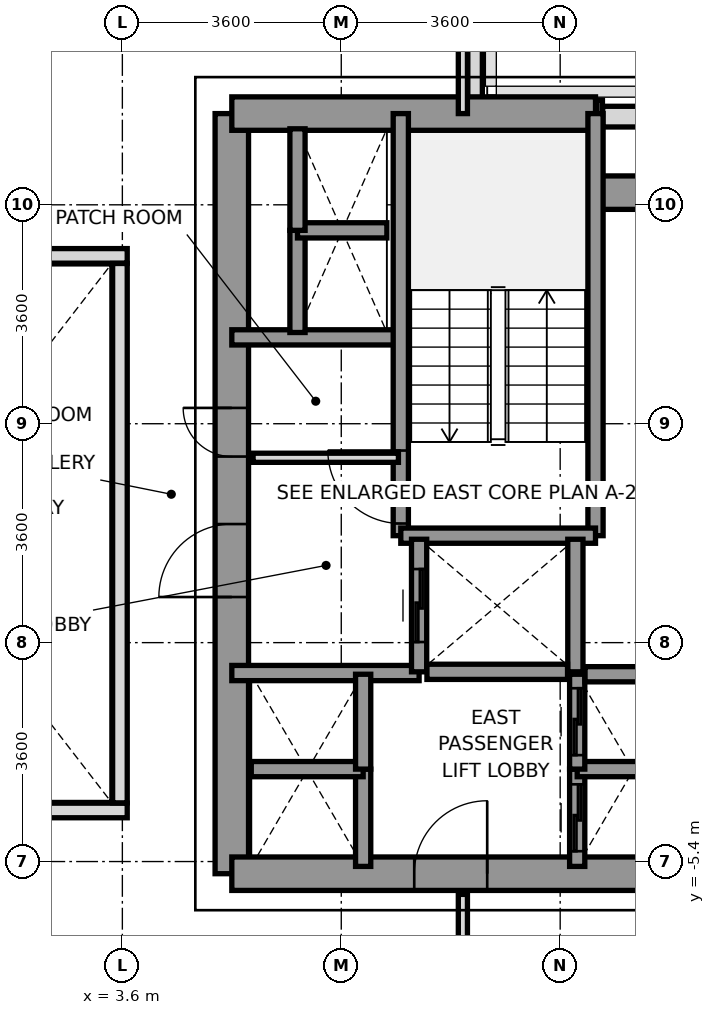
"""IFC4 building model, lengths in metres.
Left out: names, types, materials, properties, quantities, classifications, styles, units other than length and angle.
Written with IfcOpenShell. Run it as: python <this file> out.ifc"""

import sys

from ifc_helpers import new_model, si_unit, direction, frame, frame_2d, origin, place, context, subcontext, project, spatial, rectangle, extrude, source, transform, mapped, element, fill, save


model = new_model("IFC4")
c1 = context("Model", 3, precision=1e-05, world=origin(), true_north=direction((0.0, 1.0)))
c2 = subcontext(c1, "Body", "Model", "MODEL_VIEW")
j1 = project(units=[si_unit("LENGTHUNIT", "METRE"), si_unit("PLANEANGLEUNIT", "RADIAN")], contexts=[c1])
p1 = place(None, origin())
s1 = spatial("IfcSite", under=j1, at=p1, CompositionType="ELEMENT")
p2 = place(p1, origin())
s2 = spatial("IfcBuilding", under=s1, at=p2, CompositionType="ELEMENT")
p3 = place(p2, frame((0.0, 0.0, 74.8)))
s3 = spatial("IfcBuildingStorey", under=s2, at=p3, CompositionType="ELEMENT", Elevation=74.8)
p4 = place(p3, frame((11.498, 6.85, 0.0), z_axis=(0.0, 0.0, 1.0), x_axis=(1.0, 0.0, 0.0)))
e1 = element("IfcWall", 1, at=p4, inside=s3, PredefinedType="SOLIDWALL", context=c2, shape_type="SweptSolid", body=[
    extrude(rectangle(XDim=2.535, YDim=0.34, at=frame_2d((1.268, 0.0))), origin(), (0.0, 0.0, 1.0), 3.2),
])
p5 = place(p3, frame((9.4, 8.397, 0.0), z_axis=(0.0, 0.0, 1.0), x_axis=(0.0, -1.0, 0.0)))
e2 = element("IfcWall", 2, at=p5, inside=s3, PredefinedType="PARAPET", context=c2, shape_type="SweptSolid", body=[
    extrude(rectangle(XDim=1.444, YDim=0.24, at=frame_2d((0.722, 0.0))), origin(), (0.0, 0.0, 1.0), 1.15),
])
p6 = place(p3, frame((11.403, 7.0, 0.0), z_axis=(0.0, 0.0, 1.0), x_axis=(1.0, 0.0, 0.0)))
e3 = element("IfcWall", 3, at=p6, inside=s3, PredefinedType="PARAPET", context=c2, shape_type="SweptSolid", body=[
    extrude(rectangle(XDim=0.092, YDim=0.24, at=frame_2d((0.046, 0.0))), origin(), (0.0, 0.0, 1.0), 1.15),
])
p7 = place(p3, frame((5.4, -5.6, 0.0), z_axis=(0.0, 0.0, 1.0), x_axis=(0.0, 1.0, 0.0)))
e4 = element("IfcWall", 4, at=p7, inside=s3, PredefinedType="SHEAR", context=c2, shape_type="SweptSolid", body=[
    extrude(rectangle(XDim=12.5, YDim=0.55, at=frame_2d((6.25, 0.0))), origin(), (0.0, 0.0, 1.0), 3.2),
])
p8 = place(p7, frame((4.55, 0.0, 0.0)))
e5 = element("IfcOpeningElement", 5, at=p8, cuts=e4, PredefinedType="OPENING", context=c2, shape_type="SweptSolid", body=[
    extrude(rectangle(XDim=1.2, YDim=2.2, at=frame_2d((0.6, 1.1))), frame((0.0, 0.285, 0.0), z_axis=(0.0, -1.0, 0.0), x_axis=(1.0, 0.0, 0.0)), (0.0, 0.0, 1.0), 0.57),
])
p9 = place(p7, frame((6.86, 0.0, 0.0)))
e6 = element("IfcOpeningElement", 6, at=p9, cuts=e4, PredefinedType="OPENING", context=c2, shape_type="SweptSolid", body=[
    extrude(rectangle(XDim=0.8, YDim=2.1, at=frame_2d((0.4, 1.05))), frame((0.0, 0.285, 0.0), z_axis=(0.0, -1.0, 0.0), x_axis=(1.0, 0.0, 0.0)), (0.0, 0.0, 1.0), 0.57),
])
p10 = place(p3, frame((5.4, 6.9, 0.0), z_axis=(0.0, 0.0, 1.0), x_axis=(1.0, 0.0, 0.0)))
e7 = element("IfcWall", 7, at=p10, inside=s3, PredefinedType="SHEAR", context=c2, shape_type="SweptSolid", body=[
    extrude(rectangle(XDim=5.981, YDim=0.55, at=frame_2d((2.991, 0.0))), origin(), (0.0, 0.0, 1.0), 3.2),
])
p11 = place(p3, frame((11.381, 5.6, 0.0), z_axis=(0.0, 0.0, 1.0), x_axis=(1.0, 0.0, 0.0)))
e8 = element("IfcWall", 8, at=p11, inside=s3, PredefinedType="SHEAR", context=c2, shape_type="SweptSolid", body=[
    extrude(rectangle(XDim=1.819, YDim=0.55, at=frame_2d((0.909, 0.0))), origin(), (0.0, 0.0, 1.0), 3.2),
])
p12 = place(p3, frame((5.4, -5.6, 0.0), z_axis=(0.0, 0.0, 1.0), x_axis=(1.0, 0.0, 0.0)))
e9 = element("IfcWall", 9, at=p12, inside=s3, PredefinedType="SHEAR", context=c2, shape_type="SweptSolid", body=[
    extrude(rectangle(XDim=7.8, YDim=0.55, at=frame_2d((3.9, 0.0))), origin(), (0.0, 0.0, 1.0), 3.2),
])
p13 = place(p12, frame((3.0, 0.0, 0.0)))
e10 = element("IfcOpeningElement", 10, at=p13, cuts=e9, PredefinedType="OPENING", context=c2, shape_type="SweptSolid", body=[
    extrude(rectangle(XDim=1.2, YDim=2.2, at=frame_2d((0.6, 1.1))), frame((0.0, 0.285, 0.0), z_axis=(0.0, -1.0, 0.0), x_axis=(1.0, 0.0, 0.0)), (0.0, 0.0, 1.0), 0.57),
])
p14 = place(p3, frame((5.4, 3.22, 0.0), z_axis=(0.0, 0.0, 1.0), x_axis=(1.0, 0.0, 0.0)))
e11 = element("IfcWall", 11, at=p14, inside=s3, PredefinedType="SOLIDWALL", context=c2, shape_type="SweptSolid", body=[
    extrude(rectangle(XDim=2.78, YDim=0.25, at=frame_2d((1.39, 0.0))), origin(), (0.0, 0.0, 1.0), 3.2),
])
p15 = place(p3, frame((5.4, -2.3, 0.0), z_axis=(0.0, 0.0, 1.0), x_axis=(1.0, 0.0, 0.0)))
e12 = element("IfcWall", 12, at=p15, inside=s3, PredefinedType="SOLIDWALL", context=c2, shape_type="SweptSolid", body=[
    extrude(rectangle(XDim=3.08, YDim=0.25, at=frame_2d((1.54, 0.0))), origin(), (0.0, 0.0, 1.0), 3.2),
])
p16 = place(p3, frame((8.179, -0.041, 0.0), z_axis=(0.0, 0.0, 1.0), x_axis=(0.0, 1.0, 0.0)))
e13 = element("IfcWall", 13, at=p16, inside=s3, PredefinedType="SOLIDWALL", context=c2, shape_type="SweptSolid", body=[
    extrude(rectangle(XDim=6.941, YDim=0.25, at=frame_2d((3.47, 0.0))), origin(), (0.0, 0.0, 1.0), 3.2),
])
p17 = place(p16, frame((0.2, 0.0, 0.0)))
e14 = element("IfcOpeningElement", 14, at=p17, cuts=e13, PredefinedType="OPENING", context=c2, shape_type="SweptSolid", body=[
    extrude(rectangle(XDim=1.2, YDim=2.2, at=frame_2d((0.6, 1.1))), frame((0.0, 0.135, 0.0), z_axis=(0.0, -1.0, 0.0), x_axis=(1.0, 0.0, 0.0)), (0.0, 0.0, 1.0), 0.27),
])
p18 = place(p3, frame((11.381, -0.041, 0.0), z_axis=(0.0, 0.0, 1.0), x_axis=(0.0, 1.0, 0.0)))
e15 = element("IfcWall", 15, at=p18, inside=s3, PredefinedType="SOLIDWALL", context=c2, shape_type="SweptSolid", body=[
    extrude(rectangle(XDim=6.941, YDim=0.25, at=frame_2d((3.47, 0.0))), origin(), (0.0, 0.0, 1.0), 3.2),
])
p19 = place(p3, frame((8.179, -0.041, 0.0), z_axis=(0.0, 0.0, 1.0), x_axis=(1.0, 0.0, 0.0)))
e16 = element("IfcWall", 16, at=p19, inside=s3, PredefinedType="SOLIDWALL", context=c2, shape_type="SweptSolid", body=[
    extrude(rectangle(XDim=3.202, YDim=0.25, at=frame_2d((1.601, 0.0))), origin(), (0.0, 0.0, 1.0), 3.2),
])
p20 = place(p3, frame((8.48, -2.28, 0.0), z_axis=(0.0, 0.0, 1.0), x_axis=(0.0, 1.0, 0.0)))
e17 = element("IfcWall", 17, at=p20, inside=s3, PredefinedType="SOLIDWALL", context=c2, shape_type="SweptSolid", body=[
    extrude(rectangle(XDim=2.18, YDim=0.25, at=frame_2d((1.09, 0.0))), origin(), (0.0, 0.0, 1.0), 3.2),
])
p21 = place(p20, frame((0.49, 0.0, 0.0)))
e18 = element("IfcOpeningElement", 18, at=p21, cuts=e17, PredefinedType="OPENING", context=c2, shape_type="SweptSolid", body=[
    extrude(rectangle(XDim=1.2, YDim=2.2, at=frame_2d((0.6, 1.1))), frame((0.0, 0.135, 0.0), z_axis=(0.0, -1.0, 0.0), x_axis=(1.0, 0.0, 0.0)), (0.0, 0.0, 1.0), 0.27),
])
p22 = place(p3, frame((11.05, -2.28, 0.0), z_axis=(0.0, 0.0, 1.0), x_axis=(0.0, 1.0, 0.0)))
e19 = element("IfcWall", 19, at=p22, inside=s3, PredefinedType="SOLIDWALL", context=c2, shape_type="SweptSolid", body=[
    extrude(rectangle(XDim=2.18, YDim=0.25, at=frame_2d((1.09, 0.0))), origin(), (0.0, 0.0, 1.0), 3.2),
])
p23 = place(p3, frame((8.609, -2.28, 0.0), z_axis=(0.0, 0.0, 1.0), x_axis=(1.0, 0.0, 0.0)))
e20 = element("IfcWall", 20, at=p23, inside=s3, PredefinedType="SOLIDWALL", context=c2, shape_type="SweptSolid", body=[
    extrude(rectangle(XDim=2.312, YDim=0.25, at=frame_2d((1.156, 0.0))), origin(), (0.0, 0.0, 1.0), 3.2),
])
p24 = place(p3, frame((11.08, -5.48, 0.0), z_axis=(0.0, 0.0, 1.0), x_axis=(0.0, 1.0, 0.0)))
e21 = element("IfcWall", 21, at=p24, inside=s3, PredefinedType="SOLIDWALL", context=c2, shape_type="SweptSolid", body=[
    extrude(rectangle(XDim=1.6, YDim=0.25, at=frame_2d((0.8, 0.0))), origin(), (0.0, 0.0, 1.0), 3.2),
])
p25 = place(p24, frame((0.25, 0.0, 0.0)))
e22 = element("IfcOpeningElement", 22, at=p25, cuts=e21, PredefinedType="OPENING", context=c2, shape_type="SweptSolid", body=[
    extrude(rectangle(XDim=1.1, YDim=2.2, at=frame_2d((0.55, 1.1))), frame((0.0, 0.135, 0.0), z_axis=(0.0, -1.0, 0.0), x_axis=(1.0, 0.0, 0.0)), (0.0, 0.0, 1.0), 0.27),
])
p26 = place(p3, frame((11.08, -3.88, 0.0), z_axis=(0.0, 0.0, 1.0), x_axis=(1.0, 0.0, 0.0)))
e23 = element("IfcWall", 23, at=p26, inside=s3, PredefinedType="SOLIDWALL", context=c2, shape_type="SweptSolid", body=[
    extrude(rectangle(XDim=1.84, YDim=0.25, at=frame_2d((0.92, 0.0))), origin(), (0.0, 0.0, 1.0), 3.2),
])
p27 = place(p3, frame((11.08, -3.88, 0.0), z_axis=(0.0, 0.0, 1.0), x_axis=(0.0, 1.0, 0.0)))
e24 = element("IfcWall", 24, at=p27, inside=s3, PredefinedType="SOLIDWALL", context=c2, shape_type="SweptSolid", body=[
    extrude(rectangle(XDim=1.56, YDim=0.25, at=frame_2d((0.78, 0.0))), origin(), (0.0, 0.0, 1.0), 3.2),
])
p28 = place(p27, frame((0.23, 0.0, 0.0)))
e25 = element("IfcOpeningElement", 25, at=p28, cuts=e24, PredefinedType="OPENING", context=c2, shape_type="SweptSolid", body=[
    extrude(rectangle(XDim=1.1, YDim=2.2, at=frame_2d((0.55, 1.1))), frame((0.0, 0.135, 0.0), z_axis=(0.0, -1.0, 0.0), x_axis=(1.0, 0.0, 0.0)), (0.0, 0.0, 1.0), 0.27),
])
p29 = place(p3, frame((11.209, -2.32, 0.0), z_axis=(0.0, 0.0, 1.0), x_axis=(1.0, 0.0, 0.0)))
e26 = element("IfcWall", 26, at=p29, inside=s3, PredefinedType="SOLIDWALL", context=c2, shape_type="SweptSolid", body=[
    extrude(rectangle(XDim=1.582, YDim=0.25, at=frame_2d((0.791, 0.0))), origin(), (0.0, 0.0, 1.0), 3.2),
])
p30 = place(p3, frame((7.56, -5.48, 0.0), z_axis=(0.0, 0.0, 1.0), x_axis=(0.0, 1.0, 0.0)))
e27 = element("IfcWall", 27, at=p30, inside=s3, PredefinedType="SOLIDWALL", context=c2, shape_type="SweptSolid", body=[
    extrude(rectangle(XDim=1.6, YDim=0.25, at=frame_2d((0.8, 0.0))), origin(), (0.0, 0.0, 1.0), 3.2),
])
p31 = place(p3, frame((5.72, -3.88, 0.0), z_axis=(0.0, 0.0, 1.0), x_axis=(1.0, 0.0, 0.0)))
e28 = element("IfcWall", 28, at=p31, inside=s3, PredefinedType="SOLIDWALL", context=c2, shape_type="SweptSolid", body=[
    extrude(rectangle(XDim=1.84, YDim=0.25, at=frame_2d((0.92, 0.0))), origin(), (0.0, 0.0, 1.0), 3.2),
])
p32 = place(p3, frame((7.56, -3.88, 0.0), z_axis=(0.0, 0.0, 1.0), x_axis=(0.0, 1.0, 0.0)))
e29 = element("IfcWall", 29, at=p32, inside=s3, PredefinedType="SOLIDWALL", context=c2, shape_type="SweptSolid", body=[
    extrude(rectangle(XDim=1.56, YDim=0.25, at=frame_2d((0.78, 0.0))), origin(), (0.0, 0.0, 1.0), 3.2),
])
p33 = place(p3, frame((6.48, 3.3, 0.0), z_axis=(0.0, 0.0, 1.0), x_axis=(0.0, 1.0, 0.0)))
e30 = element("IfcWall", 30, at=p33, inside=s3, PredefinedType="SOLIDWALL", context=c2, shape_type="SweptSolid", body=[
    extrude(rectangle(XDim=1.68, YDim=0.25, at=frame_2d((0.84, 0.0))), origin(), (0.0, 0.0, 1.0), 3.2),
])
p34 = place(p3, frame((6.48, 4.98, 0.0), z_axis=(0.0, 0.0, 1.0), x_axis=(1.0, 0.0, 0.0)))
e31 = element("IfcWall", 31, at=p34, inside=s3, PredefinedType="SOLIDWALL", context=c2, shape_type="SweptSolid", body=[
    extrude(rectangle(XDim=1.47, YDim=0.25, at=frame_2d((0.735, 0.0))), origin(), (0.0, 0.0, 1.0), 3.2),
])
p35 = place(p3, frame((6.48, 4.98, 0.0), z_axis=(0.0, 0.0, 1.0), x_axis=(0.0, 1.0, 0.0)))
e32 = element("IfcWall", 32, at=p35, inside=s3, PredefinedType="SOLIDWALL", context=c2, shape_type="SweptSolid", body=[
    extrude(rectangle(XDim=1.67, YDim=0.25, at=frame_2d((0.835, 0.0))), origin(), (0.0, 0.0, 1.0), 3.2),
])
p36 = place(p3, frame((5.75, 1.24, 0.0), z_axis=(0.0, 0.0, 1.0), x_axis=(1.0, 0.0, 0.0)))
e33 = element("IfcWall", 33, at=p36, inside=s3, PredefinedType="PARTITIONING", context=c2, shape_type="SweptSolid", body=[
    extrude(rectangle(XDim=2.39, YDim=0.15, at=frame_2d((1.195, 0.0))), origin(), (0.0, 0.0, 1.0), 2.3),
])
p37 = place(p3, frame((9.2, 6.9, 0.0), z_axis=(0.0, 0.0, 1.0), x_axis=(0.0, 1.0, 0.0)))
e34 = element("IfcWall", 34, at=p37, inside=s3, PredefinedType="PARTITIONING", context=c2, shape_type="SweptSolid", body=[
    extrude(rectangle(XDim=8.78, YDim=0.15, at=frame_2d((4.39, 0.0))), origin(), (0.0, 0.0, 1.0), 2.71),
])
p38 = place(p3, frame((9.2, -15.68, 0.0), z_axis=(0.0, 0.0, 1.0), x_axis=(0.0, 1.0, 0.0)))
e35 = element("IfcWall", 35, at=p38, inside=s3, PredefinedType="PARTITIONING", context=c2, shape_type="SweptSolid", body=[
    extrude(rectangle(XDim=9.74, YDim=0.15, at=frame_2d((4.87, 0.0))), origin(), (0.0, 0.0, 1.0), 2.71),
])
for number, where, z_axis, x_axis in (
    (36, (-3.68, -4.56, 0.0), (0.0, 0.0, 1.0), (1.0, 0.0, 0.0)),
    (37, (-3.68, 4.56, 0.0), (0.0, 0.0, 1.0), (1.0, 0.0, 0.0)),
):
    element("IfcWall", number, at=place(p3, frame(where, z_axis=z_axis, x_axis=x_axis)), inside=s3, PredefinedType="PARAPET", context=c2, shape_type="SweptSolid", body=[
        extrude(rectangle(XDim=7.36, YDim=0.24, at=frame_2d((3.68, 0.0))), origin(), (0.0, 0.0, 1.0), 1.15),
    ])
p39 = place(p3, frame((3.56, -4.435, 0.0), z_axis=(0.0, 0.0, 1.0), x_axis=(0.0, 1.0, 0.0)))
e38 = element("IfcWall", 38, at=p39, inside=s3, PredefinedType="PARAPET", context=c2, shape_type="SweptSolid", body=[
    extrude(rectangle(XDim=8.87, YDim=0.24, at=frame_2d((4.435, 0.0))), origin(), (0.0, 0.0, 1.0), 1.15),
])
m1 = source(origin(), c2, "Body", "SweptSolid", [
    extrude(rectangle(XDim=1.2, YDim=2.2, at=frame_2d((0.6, 1.1))), frame((0.0, 0.025, 0.0), z_axis=(0.0, -1.0, 0.0), x_axis=(1.0, 0.0, 0.0)), (0.0, 0.0, 1.0), 0.05),
])
p40 = place(p17, origin())
e39 = element("IfcDoor", 39, at=p40, inside=s3, OperationType="SINGLE_SWING_RIGHT", PredefinedType="DOOR", context=c2, shape_type="MappedRepresentation", body=[
    mapped(m1, transform((0.0, 0.0, 0.0), x_axis=(1.0, 0.0, 0.0), y_axis=(0.0, 1.0, 0.0), z_axis=(0.0, 0.0, 1.0), scale=1.0)),
])
fill(e14, e39)
p41 = place(p8, origin())
e40 = element("IfcDoor", 40, at=p41, inside=s3, OperationType="SINGLE_SWING_LEFT", PredefinedType="DOOR", context=c2, shape_type="MappedRepresentation", body=[
    mapped(m1, transform((0.0, 0.0, 0.0), x_axis=(1.0, 0.0, 0.0), y_axis=(0.0, 1.0, 0.0), z_axis=(0.0, 0.0, 1.0), scale=1.0)),
])
fill(e5, e40)
p42 = place(p13, origin())
e41 = element("IfcDoor", 41, at=p42, inside=s3, OperationType="SINGLE_SWING_RIGHT", PredefinedType="DOOR", context=c2, shape_type="MappedRepresentation", body=[
    mapped(m1, transform((0.0, 0.0, 0.0), x_axis=(1.0, 0.0, 0.0), y_axis=(0.0, 1.0, 0.0), z_axis=(0.0, 0.0, 1.0), scale=1.0)),
])
fill(e10, e41)
m2 = source(origin(), c2, "Body", "SweptSolid", [
    extrude(rectangle(XDim=0.8, YDim=2.1, at=frame_2d((0.4, 1.05))), frame((0.0, 0.025, 0.0), z_axis=(0.0, -1.0, 0.0), x_axis=(1.0, 0.0, 0.0)), (0.0, 0.0, 1.0), 0.05),
])
p43 = place(p9, origin())
e42 = element("IfcDoor", 42, at=p43, inside=s3, OperationType="SINGLE_SWING_RIGHT", PredefinedType="DOOR", context=c2, shape_type="MappedRepresentation", body=[
    mapped(m2, transform((0.0, 0.0, 0.0), x_axis=(1.0, 0.0, 0.0), y_axis=(0.0, 1.0, 0.0), z_axis=(0.0, 0.0, 1.0), scale=1.0)),
])
fill(e6, e42)
p44 = place(p21, origin())
e43 = element("IfcDoor", 43, at=p44, inside=s3, OperationType="SLIDING_TO_RIGHT", PredefinedType="DOOR", context=c2, shape_type="MappedRepresentation", body=[
    mapped(m1, transform((0.0, 0.0, 0.0), x_axis=(1.0, 0.0, 0.0), y_axis=(0.0, 1.0, 0.0), z_axis=(0.0, 0.0, 1.0), scale=1.0)),
])
fill(e18, e43)
m3 = source(origin(), c2, "Body", "SweptSolid", [
    extrude(rectangle(XDim=1.1, YDim=2.2, at=frame_2d((0.55, 1.1))), frame((0.0, 0.025, 0.0), z_axis=(0.0, -1.0, 0.0), x_axis=(1.0, 0.0, 0.0)), (0.0, 0.0, 1.0), 0.05),
])
p45 = place(p25, origin())
e44 = element("IfcDoor", 44, at=p45, inside=s3, OperationType="SLIDING_TO_LEFT", PredefinedType="DOOR", context=c2, shape_type="MappedRepresentation", body=[
    mapped(m3, transform((0.0, 0.0, 0.0), x_axis=(1.0, 0.0, 0.0), y_axis=(0.0, 1.0, 0.0), z_axis=(0.0, 0.0, 1.0), scale=1.0)),
])
fill(e22, e44)
p46 = place(p28, origin())
e45 = element("IfcDoor", 45, at=p46, inside=s3, OperationType="SLIDING_TO_LEFT", PredefinedType="DOOR", context=c2, shape_type="MappedRepresentation", body=[
    mapped(m3, transform((0.0, 0.0, 0.0), x_axis=(1.0, 0.0, 0.0), y_axis=(0.0, 1.0, 0.0), z_axis=(0.0, 0.0, 1.0), scale=1.0)),
])
fill(e25, e45)
save(model, sys.argv[1])
